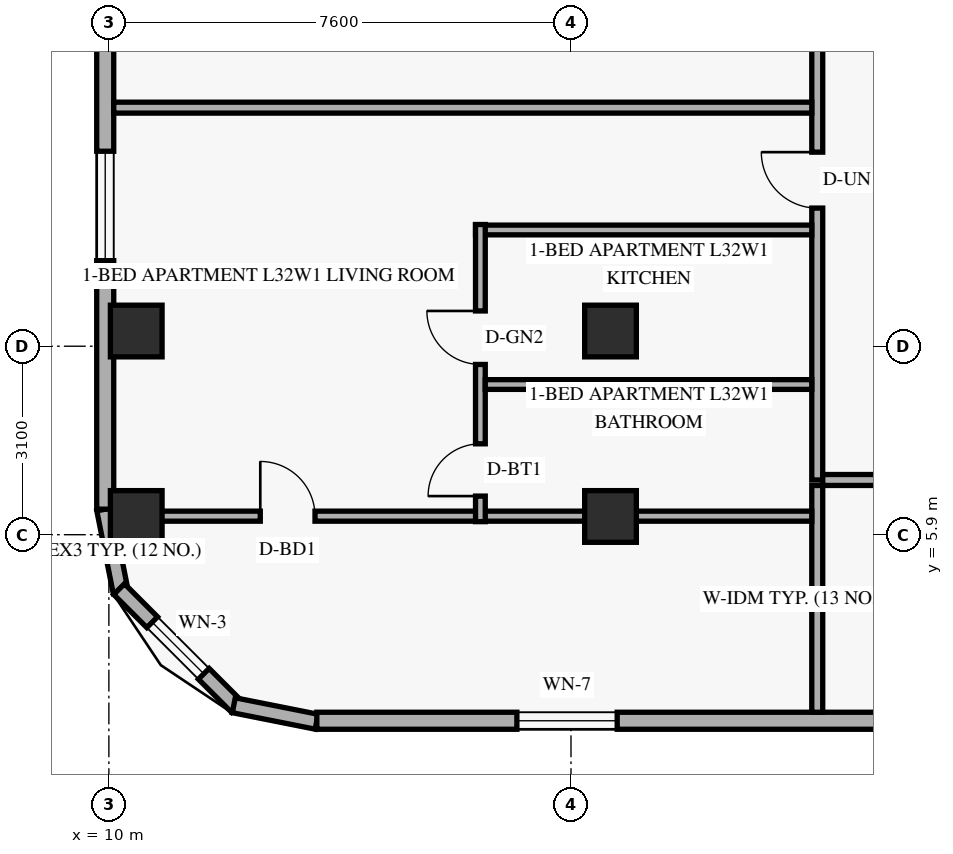
"""IFC4 building model, lengths in metres.
Left out: names, types, materials, properties, quantities, classifications, styles, units other than length and angle.
Written with IfcOpenShell. Run it as: python <this file> out.ifc"""

import sys

from ifc_helpers import new_model, si_unit, direction, frame, frame_2d, origin, origin_2d, place, context, subcontext, project, spatial, rectangle, extrude, element, fill, save


model = new_model("IFC4")
c1 = context("Model", 3, precision=1e-05, world=origin(), true_north=direction((0.0, 1.0)))
c2 = subcontext(c1, "Body", "Model", "MODEL_VIEW")
j1 = project(units=[si_unit("LENGTHUNIT", "METRE"), si_unit("PLANEANGLEUNIT", "RADIAN")], contexts=[c1])
p1 = place(None, origin())
s1 = spatial("IfcSite", under=j1, at=p1, CompositionType="ELEMENT")
p2 = place(p1, origin())
s2 = spatial("IfcBuilding", under=s1, at=p2, CompositionType="ELEMENT")
p3 = place(p2, frame((0.0, 0.0, 124.8)))
s3 = spatial("IfcBuildingStorey", under=s2, at=p3, CompositionType="ELEMENT", Elevation=124.8)
for number, where, z_axis, x_axis in (
    (1, (10.45, 6.2, 0.0), (0.0, 0.0, 1.0), (1.0, 0.0, 0.0)),
    (2, (10.45, 9.25, 0.0), (0.0, 0.0, 1.0), (1.0, 0.0, 0.0)),
    (3, (18.25, 6.2, 0.0), (0.0, 0.0, 1.0), (1.0, 0.0, 0.0)),
    (4, (18.25, 9.25, 0.0), (0.0, 0.0, 1.0), (1.0, 0.0, 0.0)),
):
    element("IfcColumn", number, at=place(p3, frame(where, z_axis=z_axis, x_axis=x_axis)), inside=s3, PredefinedType="COLUMN", context=c2, shape_type="SweptSolid", body=[
        extrude(rectangle(XDim=0.85, YDim=0.85, at=origin_2d()), origin(), (0.0, 0.0, 1.0), 3.6),
    ])
p4 = place(p3, frame((9.924, 6.316, 0.0), z_axis=(0.0, 0.0, 1.0), x_axis=(0.195000137217, -0.980803214965, 0.0)))
e5 = element("IfcWall", 5, at=p4, inside=s3, PredefinedType="SOLIDWALL", context=c2, shape_type="SweptSolid", body=[
    extrude(rectangle(XDim=1.388, YDim=0.25, at=frame_2d((0.694, 0.0))), origin(), (0.0, 0.0, 1.0), 3.36),
])
p5 = place(p3, frame((10.168, 5.005, 0.0), z_axis=(0.0, 0.0, 1.0), x_axis=(0.707151344399, -0.707062215165, 0.0)))
e6 = element("IfcWall", 6, at=p5, inside=s3, PredefinedType="SOLIDWALL", context=c2, shape_type="SweptSolid", body=[
    extrude(rectangle(XDim=2.739, YDim=0.25, at=frame_2d((1.37, 0.0))), origin(), (0.0, 0.0, 1.0), 3.36),
])
p6 = place(p5, frame((0.77, 0.0, 0.85)))
e7 = element("IfcOpeningElement", 7, at=p6, cuts=e6, PredefinedType="OPENING", context=c2, shape_type="SweptSolid", body=[
    extrude(rectangle(XDim=1.2, YDim=1.5, at=frame_2d((0.6, 0.75))), frame((0.0, 0.135, 0.0), z_axis=(0.0, -1.0, 0.0), x_axis=(1.0, 0.0, 0.0)), (0.0, 0.0, 1.0), 0.27),
])
p7 = place(p3, frame((12.054, 3.095, 0.0), z_axis=(0.0, 0.0, 1.0), x_axis=(0.980809899341, -0.19496651342, 0.0)))
e8 = element("IfcWall", 8, at=p7, inside=s3, PredefinedType="SOLIDWALL", context=c2, shape_type="SweptSolid", body=[
    extrude(rectangle(XDim=1.389, YDim=0.25, at=frame_2d((0.694, 0.0))), origin(), (0.0, 0.0, 1.0), 3.36),
])
p8 = place(p3, frame((13.42, 2.84, 0.0), z_axis=(0.0, 0.0, 1.0), x_axis=(1.0, 0.0, 0.0)))
e9 = element("IfcWall", 9, at=p8, inside=s3, PredefinedType="SOLIDWALL", context=c2, shape_type="SweptSolid", body=[
    extrude(rectangle(XDim=36.56, YDim=0.28, at=frame_2d((18.28, 0.0))), origin(), (0.0, 0.0, 1.0), 3.36),
])
p9 = place(p8, frame((3.29, 0.0, 0.85)))
e10 = element("IfcOpeningElement", 10, at=p9, cuts=e9, PredefinedType="OPENING", context=c2, shape_type="SweptSolid", body=[
    extrude(rectangle(XDim=1.65, YDim=1.6, at=frame_2d((0.825, 0.8))), frame((0.0, 0.15, 0.0), z_axis=(0.0, -1.0, 0.0), x_axis=(1.0, 0.0, 0.0)), (0.0, 0.0, 1.0), 0.3),
])
p10 = place(p8, frame((10.48, 0.0, 0.85)))
e11 = element("IfcOpeningElement", 11, at=p10, cuts=e9, PredefinedType="OPENING", context=c2, shape_type="SweptSolid", body=[
    extrude(rectangle(XDim=1.65, YDim=1.6, at=frame_2d((0.825, 0.8))), frame((0.0, 0.15, 0.0), z_axis=(0.0, -1.0, 0.0), x_axis=(1.0, 0.0, 0.0)), (0.0, 0.0, 1.0), 0.3),
])
p11 = place(p8, frame((17.365, 0.0, 0.85)))
e12 = element("IfcOpeningElement", 12, at=p11, cuts=e9, PredefinedType="OPENING", context=c2, shape_type="SweptSolid", body=[
    extrude(rectangle(XDim=1.65, YDim=1.6, at=frame_2d((0.825, 0.8))), frame((0.0, 0.15, 0.0), z_axis=(0.0, -1.0, 0.0), x_axis=(1.0, 0.0, 0.0)), (0.0, 0.0, 1.0), 0.3),
])
p12 = place(p8, frame((22.64, 0.0, 0.85)))
e13 = element("IfcOpeningElement", 13, at=p12, cuts=e9, PredefinedType="OPENING", context=c2, shape_type="SweptSolid", body=[
    extrude(rectangle(XDim=1.65, YDim=1.6, at=frame_2d((0.825, 0.8))), frame((0.0, 0.15, 0.0), z_axis=(0.0, -1.0, 0.0), x_axis=(1.0, 0.0, 0.0)), (0.0, 0.0, 1.0), 0.3),
])
p13 = place(p8, frame((28.43, 0.0, 0.85)))
e14 = element("IfcOpeningElement", 14, at=p13, cuts=e9, PredefinedType="OPENING", context=c2, shape_type="SweptSolid", body=[
    extrude(rectangle(XDim=1.65, YDim=1.6, at=frame_2d((0.825, 0.8))), frame((0.0, 0.15, 0.0), z_axis=(0.0, -1.0, 0.0), x_axis=(1.0, 0.0, 0.0)), (0.0, 0.0, 1.0), 0.3),
])
p14 = place(p8, frame((34.245, 0.0, 0.85)))
e15 = element("IfcOpeningElement", 15, at=p14, cuts=e9, PredefinedType="OPENING", context=c2, shape_type="SweptSolid", body=[
    extrude(rectangle(XDim=1.65, YDim=1.6, at=frame_2d((0.825, 0.8))), frame((0.0, 0.15, 0.0), z_axis=(0.0, -1.0, 0.0), x_axis=(1.0, 0.0, 0.0)), (0.0, 0.0, 1.0), 0.3),
])
p15 = place(p3, frame((9.94, 41.68, 0.0), z_axis=(0.0, 0.0, 1.0), x_axis=(0.0, -1.0, 0.0)))
e16 = element("IfcWall", 16, at=p15, inside=s3, PredefinedType="SOLIDWALL", context=c2, shape_type="SweptSolid", body=[
    extrude(rectangle(XDim=35.36, YDim=0.28, at=frame_2d((17.68, 0.0))), origin(), (0.0, 0.0, 1.0), 3.36),
])
p16 = place(p15, frame((29.473, 0.0, 0.85)))
e17 = element("IfcOpeningElement", 17, at=p16, cuts=e16, PredefinedType="OPENING", context=c2, shape_type="SweptSolid", body=[
    extrude(rectangle(XDim=1.8, YDim=1.6, at=frame_2d((0.9, 0.8))), frame((0.0, 0.15, 0.0), z_axis=(0.0, -1.0, 0.0), x_axis=(1.0, 0.0, 0.0)), (0.0, 0.0, 1.0), 0.3),
])
p17 = place(p15, frame((25.763, 0.0, 0.85)))
e18 = element("IfcOpeningElement", 18, at=p17, cuts=e16, PredefinedType="OPENING", context=c2, shape_type="SweptSolid", body=[
    extrude(rectangle(XDim=1.8, YDim=1.6, at=frame_2d((0.9, 0.8))), frame((0.0, 0.15, 0.0), z_axis=(0.0, -1.0, 0.0), x_axis=(1.0, 0.0, 0.0)), (0.0, 0.0, 1.0), 0.3),
])
p18 = place(p15, frame((18.732, 0.0, 0.85)))
e19 = element("IfcOpeningElement", 19, at=p18, cuts=e16, PredefinedType="OPENING", context=c2, shape_type="SweptSolid", body=[
    extrude(rectangle(XDim=1.8, YDim=1.6, at=frame_2d((0.9, 0.8))), frame((0.0, 0.15, 0.0), z_axis=(0.0, -1.0, 0.0), x_axis=(1.0, 0.0, 0.0)), (0.0, 0.0, 1.0), 0.3),
])
p19 = place(p15, frame((13.9, 0.0, 0.85)))
e20 = element("IfcOpeningElement", 20, at=p19, cuts=e16, PredefinedType="OPENING", context=c2, shape_type="SweptSolid", body=[
    extrude(rectangle(XDim=1.8, YDim=1.6, at=frame_2d((0.9, 0.8))), frame((0.0, 0.15, 0.0), z_axis=(0.0, -1.0, 0.0), x_axis=(1.0, 0.0, 0.0)), (0.0, 0.0, 1.0), 0.3),
])
p20 = place(p15, frame((7.656, 0.0, 0.85)))
e21 = element("IfcOpeningElement", 21, at=p20, cuts=e16, PredefinedType="OPENING", context=c2, shape_type="SweptSolid", body=[
    extrude(rectangle(XDim=1.8, YDim=1.6, at=frame_2d((0.9, 0.8))), frame((0.0, 0.15, 0.0), z_axis=(0.0, -1.0, 0.0), x_axis=(1.0, 0.0, 0.0)), (0.0, 0.0, 1.0), 0.3),
])
p21 = place(p15, frame((4.087, 0.0, 0.85)))
e22 = element("IfcOpeningElement", 22, at=p21, cuts=e16, PredefinedType="OPENING", context=c2, shape_type="SweptSolid", body=[
    extrude(rectangle(XDim=1.8, YDim=1.6, at=frame_2d((0.9, 0.8))), frame((0.0, 0.15, 0.0), z_axis=(0.0, -1.0, 0.0), x_axis=(1.0, 0.0, 0.0)), (0.0, 0.0, 1.0), 0.3),
])
p22 = place(p3, frame((21.65, 6.8, 0.0), z_axis=(0.0, 0.0, 1.0), x_axis=(0.0, 1.0, 0.0)))
e23 = element("IfcWall", 23, at=p22, inside=s3, PredefinedType="STANDARD", context=c2, shape_type="SweptSolid", body=[
    extrude(rectangle(XDim=34.4, YDim=0.18, at=frame_2d((17.2, 0.0))), origin(), (0.0, 0.0, 1.0), 2.731),
])
p23 = place(p22, frame((4.472, 0.0, 0.0)))
e24 = element("IfcOpeningElement", 24, at=p23, cuts=e23, PredefinedType="OPENING", context=c2, shape_type="SweptSolid", body=[
    extrude(rectangle(XDim=0.92, YDim=2.15, at=frame_2d((0.46, 1.075))), frame((0.0, 0.1, 0.0), z_axis=(0.0, -1.0, 0.0), x_axis=(1.0, 0.0, 0.0)), (0.0, 0.0, 1.0), 0.2),
])
p24 = place(p22, frame((7.261, 0.0, 0.0)))
e25 = element("IfcOpeningElement", 25, at=p24, cuts=e23, PredefinedType="OPENING", context=c2, shape_type="SweptSolid", body=[
    extrude(rectangle(XDim=0.92, YDim=2.15, at=frame_2d((0.46, 1.075))), frame((0.0, 0.1, 0.0), z_axis=(0.0, -1.0, 0.0), x_axis=(1.0, 0.0, 0.0)), (0.0, 0.0, 1.0), 0.2),
])
p25 = place(p22, frame((18.308, 0.0, 0.0)))
e26 = element("IfcOpeningElement", 26, at=p25, cuts=e23, PredefinedType="OPENING", context=c2, shape_type="SweptSolid", body=[
    extrude(rectangle(XDim=0.92, YDim=2.15, at=frame_2d((0.46, 1.075))), frame((0.0, 0.1, 0.0), z_axis=(0.0, -1.0, 0.0), x_axis=(1.0, 0.0, 0.0)), (0.0, 0.0, 1.0), 0.2),
])
p26 = place(p22, frame((29.045, 0.0, 0.0)))
e27 = element("IfcOpeningElement", 27, at=p26, cuts=e23, PredefinedType="OPENING", context=c2, shape_type="SweptSolid", body=[
    extrude(rectangle(XDim=0.92, YDim=2.15, at=frame_2d((0.46, 1.075))), frame((0.0, 0.1, 0.0), z_axis=(0.0, -1.0, 0.0), x_axis=(1.0, 0.0, 0.0)), (0.0, 0.0, 1.0), 0.2),
])
p27 = place(p3, frame((21.74, 6.8, 0.0), z_axis=(0.0, 0.0, 1.0), x_axis=(1.0, 0.0, 0.0)))
e28 = element("IfcWall", 28, at=p27, inside=s3, PredefinedType="STANDARD", context=c2, shape_type="SweptSolid", body=[
    extrude(rectangle(XDim=13.68, YDim=0.18, at=frame_2d((6.84, 0.0))), origin(), (0.0, 0.0, 1.0), 2.731),
])
p28 = place(p27, frame((0.97, 0.0, 0.0)))
e29 = element("IfcOpeningElement", 29, at=p28, cuts=e28, PredefinedType="OPENING", context=c2, shape_type="SweptSolid", body=[
    extrude(rectangle(XDim=0.95, YDim=2.15, at=frame_2d((0.475, 1.075))), frame((0.0, 0.1, 0.0), z_axis=(0.0, -1.0, 0.0), x_axis=(1.0, 0.0, 0.0)), (0.0, 0.0, 1.0), 0.2),
])
p29 = place(p27, frame((9.11, 0.0, 0.0)))
e30 = element("IfcOpeningElement", 30, at=p29, cuts=e28, PredefinedType="OPENING", context=c2, shape_type="SweptSolid", body=[
    extrude(rectangle(XDim=0.95, YDim=2.15, at=frame_2d((0.475, 1.075))), frame((0.0, 0.1, 0.0), z_axis=(0.0, -1.0, 0.0), x_axis=(1.0, 0.0, 0.0)), (0.0, 0.0, 1.0), 0.2),
])
p30 = place(p3, frame((21.65, 2.98, 0.0), z_axis=(0.0, 0.0, 1.0), x_axis=(0.0, 1.0, 0.0)))
e31 = element("IfcWall", 31, at=p30, inside=s3, PredefinedType="PARTITIONING", context=c2, shape_type="SweptSolid", body=[
    extrude(rectangle(XDim=3.73, YDim=0.18, at=frame_2d((1.865, 0.0))), origin(), (0.0, 0.0, 1.0), 2.809),
])
p31 = place(p3, frame((10.099, 6.205, 0.0), z_axis=(0.0, 0.0, 1.0), x_axis=(1.0, 0.0, 0.0)))
e32 = element("IfcWall", 32, at=p31, inside=s3, PredefinedType="PARTITIONING", context=c2, shape_type="SweptSolid", body=[
    extrude(rectangle(XDim=11.461, YDim=0.165, at=frame_2d((5.73, 0.0))), origin(), (0.0, 0.0, 1.0), 2.809),
])
p32 = place(p31, frame((2.391, 0.0, 0.0)))
e33 = element("IfcOpeningElement", 33, at=p32, cuts=e32, PredefinedType="OPENING", context=c2, shape_type="SweptSolid", body=[
    extrude(rectangle(XDim=0.9, YDim=2.14, at=frame_2d((0.45, 1.07))), frame((0.0, 0.093, 0.0), z_axis=(0.0, -1.0, 0.0), x_axis=(1.0, 0.0, 0.0)), (0.0, 0.0, 1.0), 0.185),
])
p33 = place(p3, frame((16.03, 10.912, 0.0), z_axis=(0.0, 0.0, 1.0), x_axis=(1.0, 0.0, 0.0)))
e34 = element("IfcWall", 34, at=p33, inside=s3, PredefinedType="PLUMBINGWALL", context=c2, shape_type="SweptSolid", body=[
    extrude(rectangle(XDim=5.53, YDim=0.16, at=frame_2d((2.765, 0.0))), origin(), (0.0, 0.0, 1.0), 2.731),
])
p34 = place(p3, frame((16.11, 6.115, 0.0), z_axis=(0.0, 0.0, 1.0), x_axis=(0.0, 1.0, 0.0)))
e35 = element("IfcWall", 35, at=p34, inside=s3, PredefinedType="PLUMBINGWALL", context=c2, shape_type="SweptSolid", body=[
    extrude(rectangle(XDim=4.887, YDim=0.16, at=frame_2d((2.443, 0.0))), origin(), (0.0, 0.0, 1.0), 2.731),
])
p35 = place(p34, frame((0.42, 0.0, 0.0)))
e36 = element("IfcOpeningElement", 36, at=p35, cuts=e35, PredefinedType="OPENING", context=c2, shape_type="SweptSolid", body=[
    extrude(rectangle(XDim=0.86, YDim=2.12, at=frame_2d((0.43, 1.06))), frame((0.0, 0.09, 0.0), z_axis=(0.0, -1.0, 0.0), x_axis=(1.0, 0.0, 0.0)), (0.0, 0.0, 1.0), 0.18),
])
p36 = place(p34, frame((2.585, 0.0, 0.0)))
e37 = element("IfcOpeningElement", 37, at=p36, cuts=e35, PredefinedType="OPENING", context=c2, shape_type="SweptSolid", body=[
    extrude(rectangle(XDim=0.88, YDim=2.12, at=frame_2d((0.44, 1.06))), frame((0.0, 0.09, 0.0), z_axis=(0.0, -1.0, 0.0), x_axis=(1.0, 0.0, 0.0)), (0.0, 0.0, 1.0), 0.18),
])
p37 = place(p3, frame((16.19, 8.37, 0.0), z_axis=(0.0, 0.0, 1.0), x_axis=(1.0, 0.0, 0.0)))
e38 = element("IfcWall", 38, at=p37, inside=s3, PredefinedType="PLUMBINGWALL", context=c2, shape_type="SweptSolid", body=[
    extrude(rectangle(XDim=5.37, YDim=0.16, at=frame_2d((2.685, 0.0))), origin(), (0.0, 0.0, 1.0), 2.731),
])
p38 = place(p3, frame((10.08, 12.924, 0.0), z_axis=(0.0, 0.0, 1.0), x_axis=(1.0, 0.0, 0.0)))
e39 = element("IfcWall", 39, at=p38, inside=s3, PredefinedType="PARTITIONING", context=c2, shape_type="SweptSolid", body=[
    extrude(rectangle(XDim=11.48, YDim=0.18, at=frame_2d((5.74, 0.0))), origin(), (0.0, 0.0, 1.0), 2.731),
])
p39 = place(p6, origin())
e40 = element("IfcWindow", 40, at=p39, inside=s3, PartitioningType="SINGLE_PANEL", PredefinedType="WINDOW", context=c2, shape_type="SweptSolid", body=[
    extrude(rectangle(XDim=1.2, YDim=1.5, at=frame_2d((0.6, 0.75))), frame((0.0, 0.03, 0.0), z_axis=(0.0, -1.0, 0.0), x_axis=(1.0, 0.0, 0.0)), (0.0, 0.0, 1.0), 0.06),
])
fill(e7, e40)
p40 = place(p9, origin())
e41 = element("IfcWindow", 41, at=p40, inside=s3, PartitioningType="SINGLE_PANEL", PredefinedType="WINDOW", context=c2, shape_type="SweptSolid", body=[
    extrude(rectangle(XDim=1.65, YDim=1.6, at=frame_2d((0.825, 0.8))), frame((0.0, 0.03, 0.0), z_axis=(0.0, -1.0, 0.0), x_axis=(1.0, 0.0, 0.0)), (0.0, 0.0, 1.0), 0.06),
])
fill(e10, e41)
p41 = place(p16, origin())
e42 = element("IfcWindow", 42, at=p41, inside=s3, PartitioningType="SINGLE_PANEL", PredefinedType="WINDOW", context=c2, shape_type="SweptSolid", body=[
    extrude(rectangle(XDim=1.8, YDim=1.6, at=frame_2d((0.9, 0.8))), frame((0.0, 0.03, 0.0), z_axis=(0.0, -1.0, 0.0), x_axis=(1.0, 0.0, 0.0)), (0.0, 0.0, 1.0), 0.06),
])
fill(e17, e42)
p42 = place(p23, origin())
e43 = element("IfcDoor", 43, at=p42, inside=s3, OperationType="SINGLE_SWING_RIGHT", PredefinedType="DOOR", context=c2, shape_type="SweptSolid", body=[
    extrude(rectangle(XDim=0.92, YDim=2.15, at=frame_2d((0.46, 1.075))), frame((0.0, 0.025, 0.0), z_axis=(0.0, -1.0, 0.0), x_axis=(1.0, 0.0, 0.0)), (0.0, 0.0, 1.0), 0.05),
])
fill(e24, e43)
p43 = place(p35, origin())
e44 = element("IfcDoor", 44, at=p43, inside=s3, OperationType="SINGLE_SWING_LEFT", PredefinedType="DOOR", context=c2, shape_type="SweptSolid", body=[
    extrude(rectangle(XDim=0.86, YDim=2.12, at=frame_2d((0.43, 1.06))), frame((0.0, 0.025, 0.0), z_axis=(0.0, -1.0, 0.0), x_axis=(1.0, 0.0, 0.0)), (0.0, 0.0, 1.0), 0.05),
])
fill(e36, e44)
p44 = place(p36, origin())
e45 = element("IfcDoor", 45, at=p44, inside=s3, OperationType="SINGLE_SWING_RIGHT", PredefinedType="DOOR", context=c2, shape_type="SweptSolid", body=[
    extrude(rectangle(XDim=0.88, YDim=2.12, at=frame_2d((0.44, 1.06))), frame((0.0, 0.025, 0.0), z_axis=(0.0, -1.0, 0.0), x_axis=(1.0, 0.0, 0.0)), (0.0, 0.0, 1.0), 0.05),
])
fill(e37, e45)
p45 = place(p32, origin())
e46 = element("IfcDoor", 46, at=p45, inside=s3, OperationType="SINGLE_SWING_LEFT", PredefinedType="DOOR", context=c2, shape_type="SweptSolid", body=[
    extrude(rectangle(XDim=0.9, YDim=2.14, at=frame_2d((0.45, 1.07))), frame((0.0, 0.025, 0.0), z_axis=(0.0, -1.0, 0.0), x_axis=(1.0, 0.0, 0.0)), (0.0, 0.0, 1.0), 0.05),
])
fill(e33, e46)
save(model, sys.argv[1])
